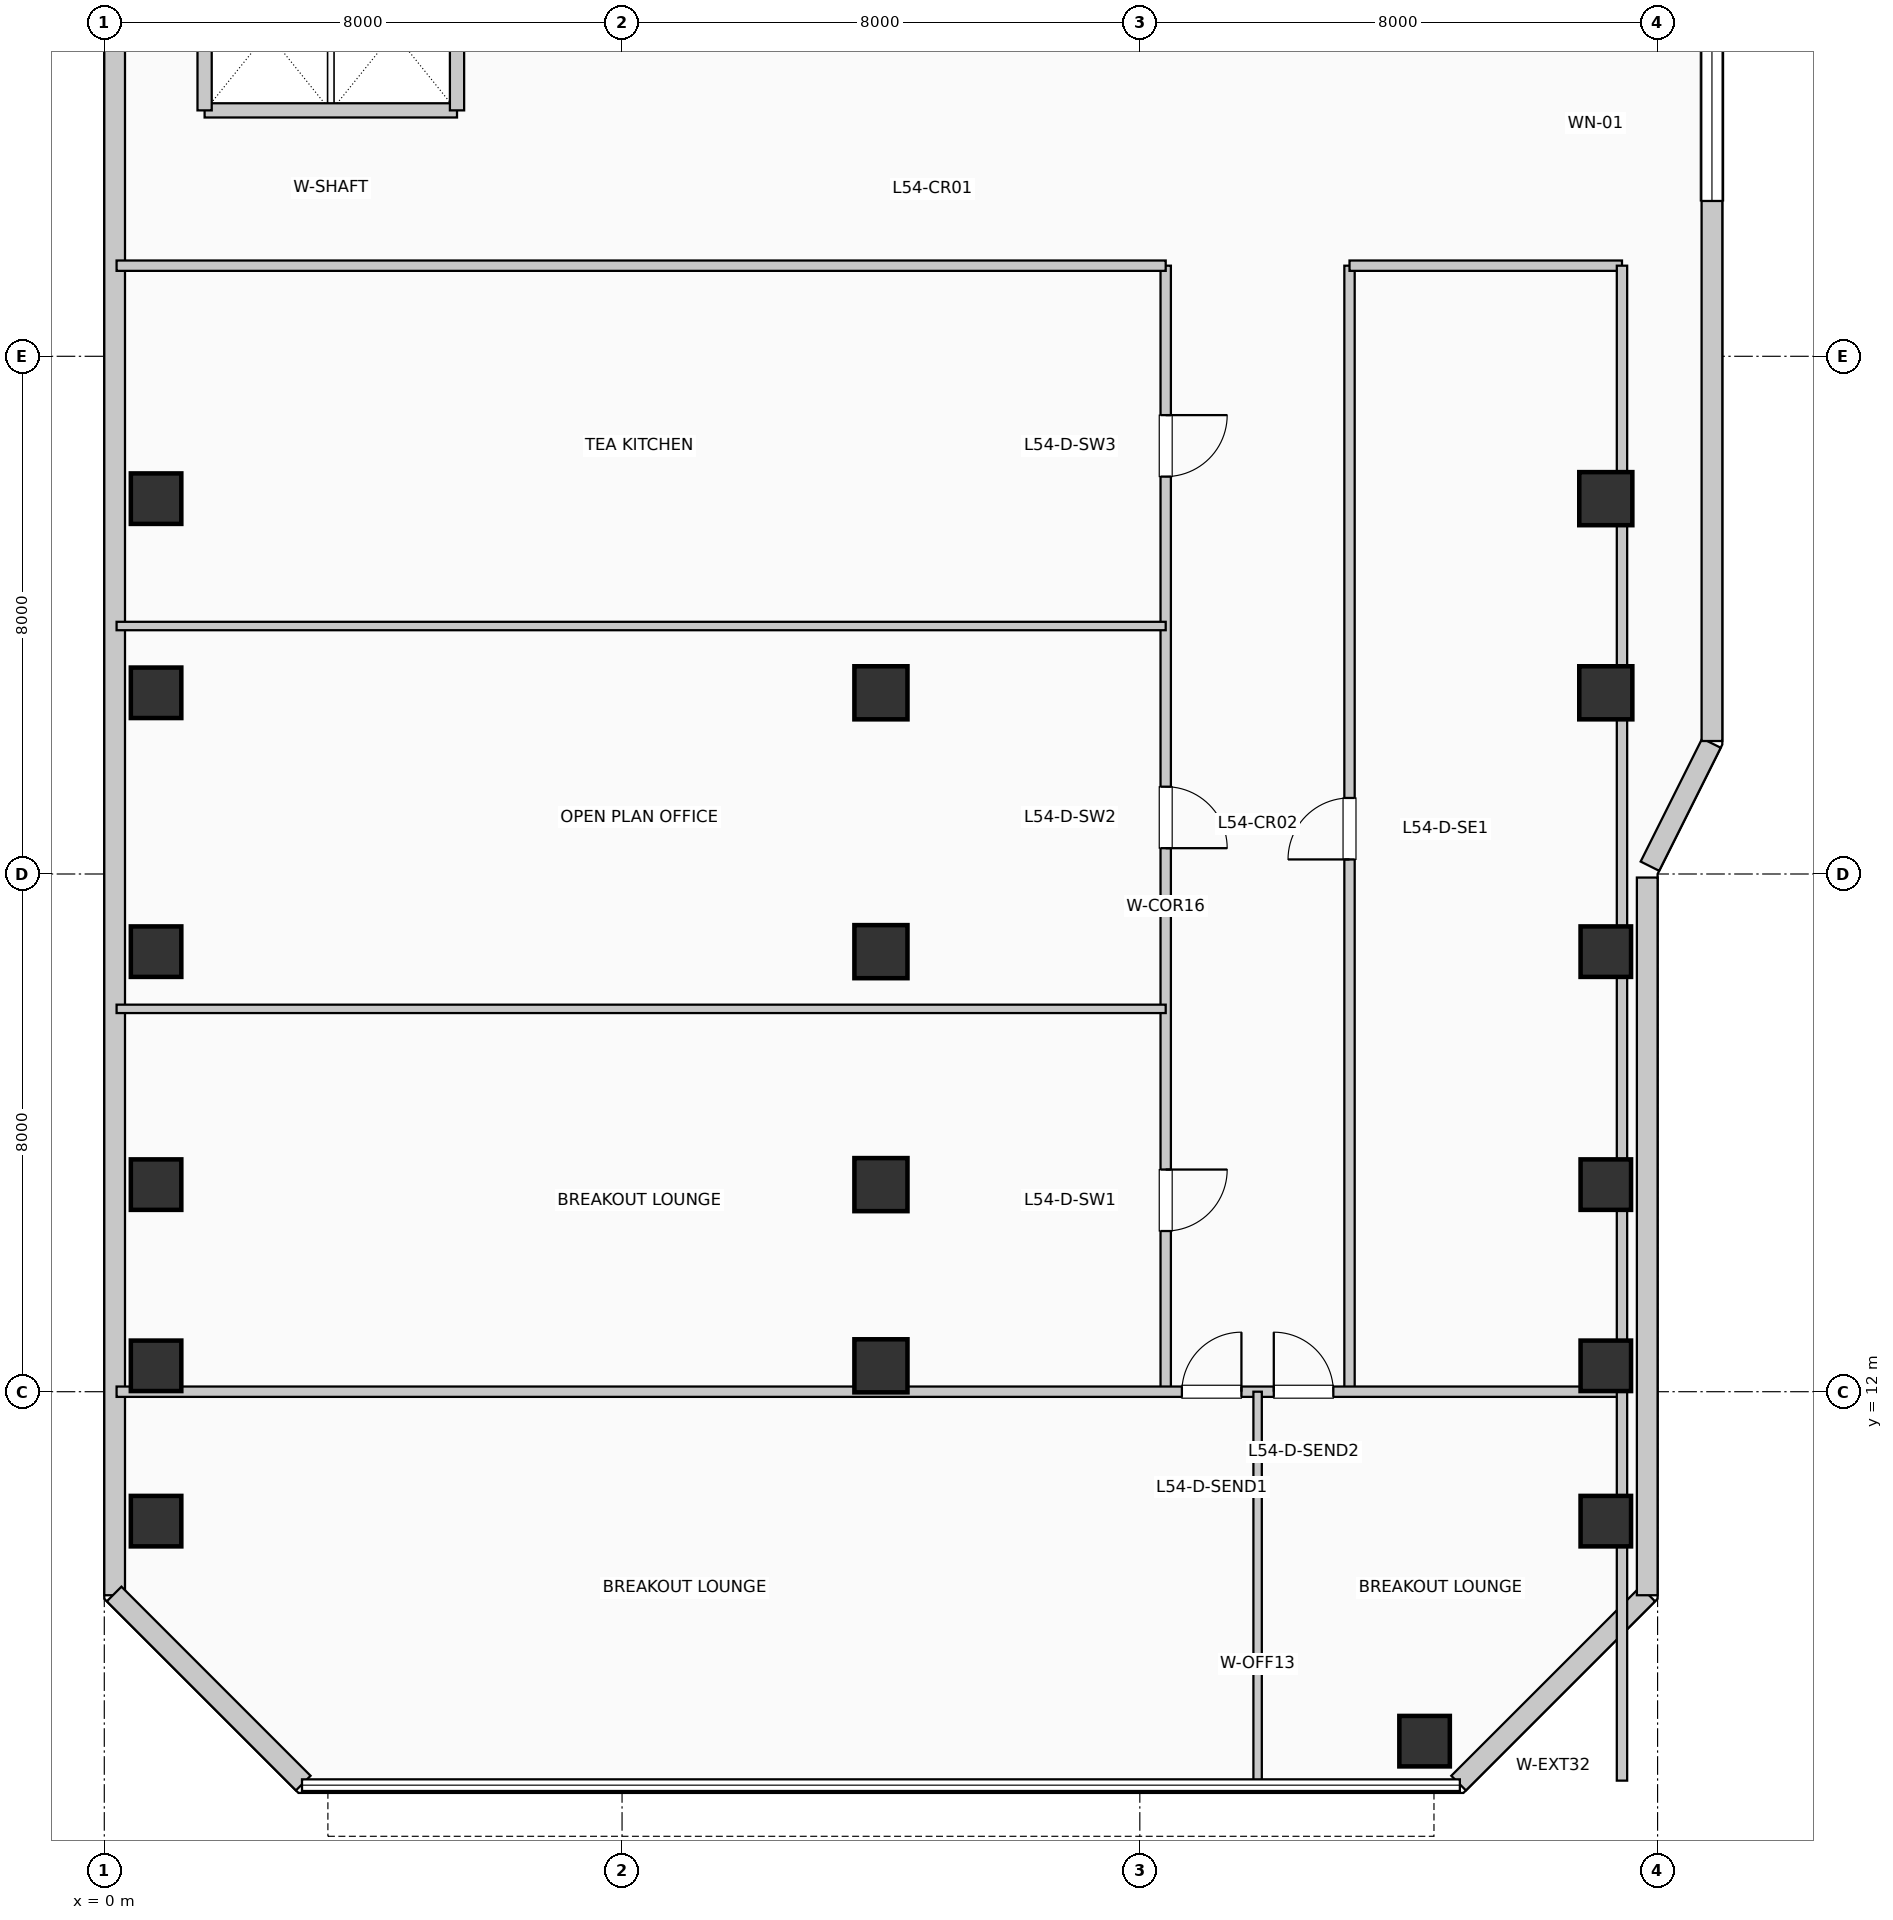
"""IFC4 building model, lengths in metres.
Left out: names, types, materials, properties, quantities, classifications, styles, units other than length and angle.
Written with IfcOpenShell. Run it as: python <this file> out.ifc"""

import sys

from ifc_helpers import new_model, si_unit, direction, frame, frame_2d, origin, origin_2d, place, context, subcontext, project, spatial, rectangle, extrude, element, fill, save


model = new_model("IFC4")
c1 = context("Model", 3, precision=1e-05, world=origin(), true_north=direction((0.0, 1.0)))
c2 = subcontext(c1, "Body", "Model", "MODEL_VIEW")
j1 = project(units=[si_unit("LENGTHUNIT", "METRE"), si_unit("PLANEANGLEUNIT", "RADIAN")], contexts=[c1])
p1 = place(None, origin())
s1 = spatial("IfcSite", under=j1, at=p1, CompositionType="ELEMENT")
p2 = place(p1, origin())
s2 = spatial("IfcBuilding", under=s1, at=p2, CompositionType="ELEMENT")
p3 = place(p2, frame((0.0, 0.0, 223.74)))
s3 = spatial("IfcBuildingStorey", under=s2, at=p3, CompositionType="ELEMENT", Elevation=223.74)
for number, where, z_axis, x_axis in (
    (1, (0.8, 10.0, 0.0), (0.0, 0.0, 1.0), (1.0, 0.0, 0.0)),
    (2, (0.8, 12.4, 0.0), (0.0, 0.0, 1.0), (1.0, 0.0, 0.0)),
    (3, (0.8, 15.2, 0.0), (0.0, 0.0, 1.0), (1.0, 0.0, 0.0)),
    (4, (0.8, 18.8, 0.0), (0.0, 0.0, 1.0), (1.0, 0.0, 0.0)),
    (5, (0.8, 22.8, 0.0), (0.0, 0.0, 1.0), (1.0, 0.0, 0.0)),
    (6, (0.8, 25.8, 0.0), (0.0, 0.0, 1.0), (1.0, 0.0, 0.0)),
):
    element("IfcColumn", number, at=place(p3, frame(where, z_axis=z_axis, x_axis=x_axis)), inside=s3, PredefinedType="COLUMN", context=c2, shape_type="SweptSolid", body=[
        extrude(rectangle(XDim=0.78, YDim=0.78, at=origin_2d()), origin(), (0.0, 0.0, 1.0), 3.96),
    ])
for number, where, z_axis, x_axis in (
    (7, (12.0, 12.4, 0.0), (0.0, 0.0, 1.0), (1.0, 0.0, 0.0)),
    (8, (12.0, 15.2, 0.0), (0.0, 0.0, 1.0), (1.0, 0.0, 0.0)),
    (9, (12.0, 18.8, 0.0), (0.0, 0.0, 1.0), (1.0, 0.0, 0.0)),
    (10, (12.0, 22.8, 0.0), (0.0, 0.0, 1.0), (1.0, 0.0, 0.0)),
):
    element("IfcColumn", number, at=place(p3, frame(where, z_axis=z_axis, x_axis=x_axis)), inside=s3, PredefinedType="COLUMN", context=c2, shape_type="SweptSolid", body=[
        extrude(rectangle(XDim=0.82, YDim=0.82, at=origin_2d()), origin(), (0.0, 0.0, 1.0), 3.96),
    ])
for number, where, z_axis, x_axis in (
    (11, (20.4, 6.6, 0.0), (0.0, 0.0, 1.0), (1.0, 0.0, 0.0)),
    (12, (23.2, 10.0, 0.0), (0.0, 0.0, 1.0), (1.0, 0.0, 0.0)),
    (13, (23.2, 12.4, 0.0), (0.0, 0.0, 1.0), (1.0, 0.0, 0.0)),
    (14, (23.2, 15.2, 0.0), (0.0, 0.0, 1.0), (1.0, 0.0, 0.0)),
    (15, (23.2, 18.8, 0.0), (0.0, 0.0, 1.0), (1.0, 0.0, 0.0)),
):
    element("IfcColumn", number, at=place(p3, frame(where, z_axis=z_axis, x_axis=x_axis)), inside=s3, PredefinedType="COLUMN", context=c2, shape_type="SweptSolid", body=[
        extrude(rectangle(XDim=0.78, YDim=0.78, at=origin_2d()), origin(), (0.0, 0.0, 1.0), 3.96),
    ])
for number, where, z_axis, x_axis in (
    (16, (23.2, 22.8, 0.0), (0.0, 0.0, 1.0), (1.0, 0.0, 0.0)),
    (17, (23.2, 25.8, 0.0), (0.0, 0.0, 1.0), (1.0, 0.0, 0.0)),
):
    element("IfcColumn", number, at=place(p3, frame(where, z_axis=z_axis, x_axis=x_axis)), inside=s3, PredefinedType="COLUMN", context=c2, shape_type="SweptSolid", body=[
        extrude(rectangle(XDim=0.82, YDim=0.82, at=origin_2d()), origin(), (0.0, 0.0, 1.0), 3.96),
    ])
p4 = place(p3, frame((20.926, 5.952, 0.0), z_axis=(0.0, 0.0, 1.0), x_axis=(0.707077242712, 0.707136318428, 0.0)))
e18 = element("IfcWall", 18, at=p4, inside=s3, PredefinedType="SOLIDWALL", context=c2, shape_type="SweptSolid", body=[
    extrude(rectangle(XDim=4.133, YDim=0.32, at=frame_2d((2.066, 0.0))), origin(), (0.0, 0.0, 1.0), 3.71),
])
p5 = place(p3, frame((23.84, 8.855, 0.0), z_axis=(0.0, 0.0, 1.0), x_axis=(0.0, 1.0, 0.0)))
e19 = element("IfcWall", 19, at=p5, inside=s3, PredefinedType="SOLIDWALL", context=c2, shape_type="SweptSolid", body=[
    extrude(rectangle(XDim=11.09, YDim=0.32, at=frame_2d((5.545, 0.0))), origin(), (0.0, 0.0, 1.0), 3.71),
])
p6 = place(p3, frame((23.882, 20.121, 0.0), z_axis=(0.0, 0.0, 1.0), x_axis=(0.447121734542, 0.894473115583, 0.0)))
e20 = element("IfcWall", 20, at=p6, inside=s3, PredefinedType="SOLIDWALL", context=c2, shape_type="SweptSolid", body=[
    extrude(rectangle(XDim=2.126, YDim=0.32, at=frame_2d((1.063, 0.0))), origin(), (0.0, 0.0, 1.0), 3.71),
])
p7 = place(p3, frame((24.84, 22.055, 0.0), z_axis=(0.0, 0.0, 1.0), x_axis=(0.0, 1.0, 0.0)))
e21 = element("IfcWall", 21, at=p7, inside=s3, PredefinedType="SOLIDWALL", context=c2, shape_type="SweptSolid", body=[
    extrude(rectangle(XDim=19.09, YDim=0.32, at=frame_2d((9.545, 0.0))), origin(), (0.0, 0.0, 1.0), 3.71),
])
p8 = place(p7, frame((8.345, 0.0, 0.85)))
e22 = element("IfcOpeningElement", 22, at=p8, cuts=e21, PredefinedType="OPENING", context=c2, shape_type="SweptSolid", body=[
    extrude(rectangle(XDim=2.4, YDim=2.05, at=frame_2d((1.2, 1.025))), frame((0.0, 0.17, 0.0), z_axis=(0.0, -1.0, 0.0), x_axis=(1.0, 0.0, 0.0)), (0.0, 0.0, 1.0), 0.34),
])
p9 = place(p3, frame((0.16, 34.395, 0.0), z_axis=(0.0, 0.0, 1.0), x_axis=(0.0, -1.0, 0.0)))
e23 = element("IfcWall", 23, at=p9, inside=s3, PredefinedType="SOLIDWALL", context=c2, shape_type="SweptSolid", body=[
    extrude(rectangle(XDim=25.54, YDim=0.32, at=frame_2d((12.77, 0.0))), origin(), (0.0, 0.0, 1.0), 3.71),
])
p10 = place(p3, frame((0.152, 8.874, 0.0), z_axis=(0.0, 0.0, 1.0), x_axis=(0.707077242712, -0.707136318428, 0.0)))
e24 = element("IfcWall", 24, at=p10, inside=s3, PredefinedType="SOLIDWALL", context=c2, shape_type="SweptSolid", body=[
    extrude(rectangle(XDim=4.133, YDim=0.32, at=frame_2d((2.066, 0.0))), origin(), (0.0, 0.0, 1.0), 3.71),
])
p11 = place(p3, frame((1.55, 31.8, 0.0), z_axis=(0.0, 0.0, 1.0), x_axis=(1.0, 0.0, 0.0)))
e25 = element("IfcWall", 25, at=p11, inside=s3, PredefinedType="PARTITIONING", context=c2, shape_type="SweptSolid", body=[
    extrude(rectangle(XDim=3.9, YDim=0.22, at=frame_2d((1.95, 0.0))), origin(), (0.0, 0.0, 1.0), 3.71),
])
for number, where, z_axis, x_axis in (
    (26, (1.55, 31.8, 0.0), (0.0, 0.0, 1.0), (0.0, 1.0, 0.0)),
    (27, (5.45, 31.8, 0.0), (0.0, 0.0, 1.0), (0.0, 1.0, 0.0)),
):
    element("IfcWall", number, at=place(p3, frame(where, z_axis=z_axis, x_axis=x_axis)), inside=s3, PredefinedType="PARTITIONING", context=c2, shape_type="SweptSolid", body=[
        extrude(rectangle(XDim=2.38, YDim=0.22, at=frame_2d((1.19, 0.0))), origin(), (0.0, 0.0, 1.0), 3.71),
    ])
p12 = place(p3, frame((16.4, 12.0, 0.0), z_axis=(0.0, 0.0, 1.0), x_axis=(0.0, 1.0, 0.0)))
e28 = element("IfcWall", 28, at=p12, inside=s3, PredefinedType="PARTITIONING", context=c2, shape_type="SweptSolid", body=[
    extrude(rectangle(XDim=17.4, YDim=0.16, at=frame_2d((8.7, 0.0))), origin(), (0.0, 0.0, 1.0), 3.71),
])
p13 = place(p12, frame((3.433, 0.0, 0.0), z_axis=(0.0, 0.0, 1.0), x_axis=(-1.0, 0.0, 0.0)))
e29 = element("IfcOpeningElement", 29, at=p13, cuts=e28, PredefinedType="OPENING", context=c2, shape_type="SweptSolid", body=[
    extrude(rectangle(XDim=0.95, YDim=2.15, at=frame_2d((0.475, 1.075))), frame((0.0, 0.09, 0.0), z_axis=(0.0, -1.0, 0.0), x_axis=(1.0, 0.0, 0.0)), (0.0, 0.0, 1.0), 0.18),
])
p14 = place(p12, frame((9.349, 0.0, 0.0), z_axis=(0.0, 0.0, 1.0), x_axis=(-1.0, 0.0, 0.0)))
e30 = element("IfcOpeningElement", 30, at=p14, cuts=e28, PredefinedType="OPENING", context=c2, shape_type="SweptSolid", body=[
    extrude(rectangle(XDim=0.95, YDim=2.15, at=frame_2d((0.475, 1.075))), frame((0.0, 0.09, 0.0), z_axis=(0.0, -1.0, 0.0), x_axis=(1.0, 0.0, 0.0)), (0.0, 0.0, 1.0), 0.18),
])
p15 = place(p12, frame((15.091, 0.0, 0.0), z_axis=(0.0, 0.0, 1.0), x_axis=(-1.0, 0.0, 0.0)))
e31 = element("IfcOpeningElement", 31, at=p15, cuts=e28, PredefinedType="OPENING", context=c2, shape_type="SweptSolid", body=[
    extrude(rectangle(XDim=0.95, YDim=2.15, at=frame_2d((0.475, 1.075))), frame((0.0, 0.09, 0.0), z_axis=(0.0, -1.0, 0.0), x_axis=(1.0, 0.0, 0.0)), (0.0, 0.0, 1.0), 0.18),
])
p16 = place(p3, frame((19.24, 12.0, 0.0), z_axis=(0.0, 0.0, 1.0), x_axis=(0.0, 1.0, 0.0)))
e32 = element("IfcWall", 32, at=p16, inside=s3, PredefinedType="PARTITIONING", context=c2, shape_type="SweptSolid", body=[
    extrude(rectangle(XDim=17.4, YDim=0.16, at=frame_2d((8.7, 0.0))), origin(), (0.0, 0.0, 1.0), 3.71),
])
p17 = place(p16, frame((8.225, 0.0, 0.0)))
e33 = element("IfcOpeningElement", 33, at=p17, cuts=e32, PredefinedType="OPENING", context=c2, shape_type="SweptSolid", body=[
    extrude(rectangle(XDim=0.95, YDim=2.15, at=frame_2d((0.475, 1.075))), frame((0.0, 0.09, 0.0), z_axis=(0.0, -1.0, 0.0), x_axis=(1.0, 0.0, 0.0)), (0.0, 0.0, 1.0), 0.18),
])
p18 = place(p3, frame((0.19, 12.0, 0.0), z_axis=(0.0, 0.0, 1.0), x_axis=(1.0, 0.0, 0.0)))
e34 = element("IfcWall", 34, at=p18, inside=s3, PredefinedType="PARTITIONING", context=c2, shape_type="SweptSolid", body=[
    extrude(rectangle(XDim=23.26, YDim=0.16, at=frame_2d((11.63, 0.0))), origin(), (0.0, 0.0, 1.0), 3.095),
])
p19 = place(p18, frame((16.46, 0.0, 0.0)))
e35 = element("IfcOpeningElement", 35, at=p19, cuts=e34, PredefinedType="OPENING", context=c2, shape_type="SweptSolid", body=[
    extrude(rectangle(XDim=0.92, YDim=2.1, at=frame_2d((0.46, 1.05))), frame((0.0, 0.09, 0.0), z_axis=(0.0, -1.0, 0.0), x_axis=(1.0, 0.0, 0.0)), (0.0, 0.0, 1.0), 0.18),
])
p20 = place(p18, frame((17.88, 0.0, 0.0)))
e36 = element("IfcOpeningElement", 36, at=p20, cuts=e34, PredefinedType="OPENING", context=c2, shape_type="SweptSolid", body=[
    extrude(rectangle(XDim=0.92, YDim=2.1, at=frame_2d((0.46, 1.05))), frame((0.0, 0.09, 0.0), z_axis=(0.0, -1.0, 0.0), x_axis=(1.0, 0.0, 0.0)), (0.0, 0.0, 1.0), 0.18),
])
p21 = place(p3, frame((0.19, 29.4, 0.0), z_axis=(0.0, 0.0, 1.0), x_axis=(1.0, 0.0, 0.0)))
e37 = element("IfcWall", 37, at=p21, inside=s3, PredefinedType="PARTITIONING", context=c2, shape_type="SweptSolid", body=[
    extrude(rectangle(XDim=16.21, YDim=0.16, at=frame_2d((8.105, 0.0))), origin(), (0.0, 0.0, 1.0), 3.365),
])
p22 = place(p3, frame((19.24, 29.4, 0.0), z_axis=(0.0, 0.0, 1.0), x_axis=(1.0, 0.0, 0.0)))
e38 = element("IfcWall", 38, at=p22, inside=s3, PredefinedType="PARTITIONING", context=c2, shape_type="SweptSolid", body=[
    extrude(rectangle(XDim=4.21, YDim=0.16, at=frame_2d((2.105, 0.0))), origin(), (0.0, 0.0, 1.0), 3.365),
])
p23 = place(p3, frame((23.45, 5.99, 0.0), z_axis=(0.0, 0.0, 1.0), x_axis=(0.0, 1.0, 0.0)))
e39 = element("IfcWall", 39, at=p23, inside=s3, PredefinedType="PARTITIONING", context=c2, shape_type="SweptSolid", body=[
    extrude(rectangle(XDim=23.41, YDim=0.16, at=frame_2d((11.705, 0.0))), origin(), (0.0, 0.0, 1.0), 3.095),
])
p24 = place(p3, frame((17.82, 5.99, 0.0), z_axis=(0.0, 0.0, 1.0), x_axis=(0.0, 1.0, 0.0)))
e40 = element("IfcWall", 40, at=p24, inside=s3, PredefinedType="PARTITIONING", context=c2, shape_type="SweptSolid", body=[
    extrude(rectangle(XDim=6.01, YDim=0.13, at=frame_2d((3.005, 0.0))), origin(), (0.0, 0.0, 1.0), 3.71),
])
for number, where, z_axis, x_axis in (
    (41, (0.19, 17.916, 0.0), (0.0, 0.0, 1.0), (1.0, 0.0, 0.0)),
    (42, (0.19, 23.832, 0.0), (0.0, 0.0, 1.0), (1.0, 0.0, 0.0)),
):
    element("IfcWall", number, at=place(p3, frame(where, z_axis=z_axis, x_axis=x_axis)), inside=s3, PredefinedType="PARTITIONING", context=c2, shape_type="SweptSolid", body=[
        extrude(rectangle(XDim=16.21, YDim=0.13, at=frame_2d((8.105, 0.0))), origin(), (0.0, 0.0, 1.0), 3.71),
    ])
p25 = place(p8, origin())
e43 = element("IfcWindow", 43, at=p25, inside=s3, PartitioningType="SINGLE_PANEL", PredefinedType="WINDOW", context=c2, shape_type="SweptSolid", body=[
    extrude(rectangle(XDim=2.4, YDim=2.05, at=frame_2d((1.2, 1.025))), frame((0.0, 0.03, 0.0), z_axis=(0.0, -1.0, 0.0), x_axis=(1.0, 0.0, 0.0)), (0.0, 0.0, 1.0), 0.06),
])
fill(e22, e43)
p26 = place(p19, origin())
e44 = element("IfcDoor", 44, at=p26, inside=s3, OperationType="SINGLE_SWING_RIGHT", PredefinedType="DOOR", context=c2, shape_type="SweptSolid", body=[
    extrude(rectangle(XDim=0.92, YDim=2.1, at=frame_2d((0.46, 1.05))), frame((0.0, 0.025, 0.0), z_axis=(0.0, -1.0, 0.0), x_axis=(1.0, 0.0, 0.0)), (0.0, 0.0, 1.0), 0.05),
])
fill(e35, e44)
p27 = place(p20, origin())
e45 = element("IfcDoor", 45, at=p27, inside=s3, OperationType="SINGLE_SWING_LEFT", PredefinedType="DOOR", context=c2, shape_type="SweptSolid", body=[
    extrude(rectangle(XDim=0.92, YDim=2.1, at=frame_2d((0.46, 1.05))), frame((0.0, 0.025, 0.0), z_axis=(0.0, -1.0, 0.0), x_axis=(1.0, 0.0, 0.0)), (0.0, 0.0, 1.0), 0.05),
])
fill(e36, e45)
p28 = place(p13, origin())
e46 = element("IfcDoor", 46, at=p28, inside=s3, OperationType="SINGLE_SWING_RIGHT", PredefinedType="DOOR", context=c2, shape_type="SweptSolid", body=[
    extrude(rectangle(XDim=0.95, YDim=2.15, at=frame_2d((0.475, 1.075))), frame((0.0, 0.025, 0.0), z_axis=(0.0, -1.0, 0.0), x_axis=(1.0, 0.0, 0.0)), (0.0, 0.0, 1.0), 0.05),
])
fill(e29, e46)
p29 = place(p14, origin())
e47 = element("IfcDoor", 47, at=p29, inside=s3, OperationType="SINGLE_SWING_LEFT", PredefinedType="DOOR", context=c2, shape_type="SweptSolid", body=[
    extrude(rectangle(XDim=0.95, YDim=2.15, at=frame_2d((0.475, 1.075))), frame((0.0, 0.025, 0.0), z_axis=(0.0, -1.0, 0.0), x_axis=(1.0, 0.0, 0.0)), (0.0, 0.0, 1.0), 0.05),
])
fill(e30, e47)
p30 = place(p15, origin())
e48 = element("IfcDoor", 48, at=p30, inside=s3, OperationType="SINGLE_SWING_RIGHT", PredefinedType="DOOR", context=c2, shape_type="SweptSolid", body=[
    extrude(rectangle(XDim=0.95, YDim=2.15, at=frame_2d((0.475, 1.075))), frame((0.0, 0.025, 0.0), z_axis=(0.0, -1.0, 0.0), x_axis=(1.0, 0.0, 0.0)), (0.0, 0.0, 1.0), 0.05),
])
fill(e31, e48)
p31 = place(p17, origin())
e49 = element("IfcDoor", 49, at=p31, inside=s3, OperationType="SINGLE_SWING_LEFT", PredefinedType="DOOR", context=c2, shape_type="SweptSolid", body=[
    extrude(rectangle(XDim=0.95, YDim=2.15, at=frame_2d((0.475, 1.075))), frame((0.0, 0.025, 0.0), z_axis=(0.0, -1.0, 0.0), x_axis=(1.0, 0.0, 0.0)), (0.0, 0.0, 1.0), 0.05),
])
fill(e33, e49)
save(model, sys.argv[1])
